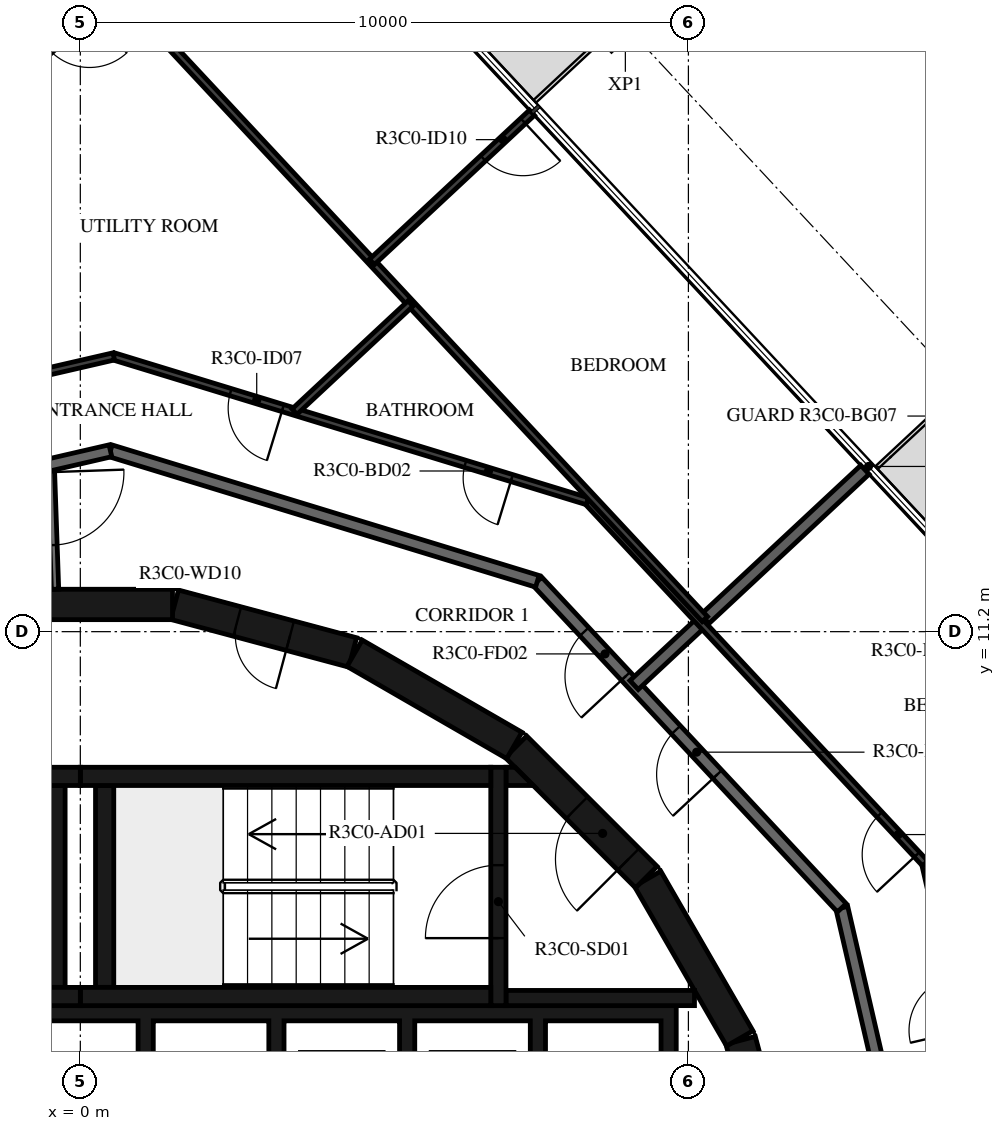
"""IFC4 building model, lengths in metres.
Left out: names, types, materials, properties, quantities, classifications, styles, units other than length and angle.
Written with IfcOpenShell. Run it as: python <this file> out.ifc"""

import sys

from ifc_helpers import new_model, si_unit, direction, frame, frame_2d, origin, place, context, subcontext, project, spatial, polyline, rectangle, outline, extrude, element, fill, save


model = new_model("IFC4")
c1 = context("Model", 3, precision=1e-05, world=origin(), true_north=direction((0.0, 1.0)))
c2 = subcontext(c1, "Body", "Model", "MODEL_VIEW")
j1 = project(units=[si_unit("LENGTHUNIT", "METRE"), si_unit("PLANEANGLEUNIT", "RADIAN")], contexts=[c1])
p1 = place(None, origin())
s1 = spatial("IfcSite", under=j1, at=p1, CompositionType="ELEMENT")
p2 = place(p1, origin())
s2 = spatial("IfcBuilding", under=s1, at=p2, CompositionType="ELEMENT")
p3 = place(p2, frame((0.0, 0.0, 141.4)))
s3 = spatial("IfcBuildingStorey", under=s2, at=p3, CompositionType="ELEMENT", Elevation=141.4)
for number, where, z_axis, x_axis in (
    (1, (11.643, 1.55, 0.0), (0.0, 0.0, 1.0), (-0.259, 0.966, 0.0)),
    (2, (10.845, 4.51, 0.0), (0.0, 0.0, 1.0), (-0.5, 0.866, 0.0)),
):
    element("IfcWall", number, at=place(p3, frame(where, z_axis=z_axis, x_axis=x_axis)), inside=s3, PredefinedType="SHEAR", context=c2, shape_type="SweptSolid", body=[
        extrude(rectangle(XDim=3.033, YDim=0.5, at=frame_2d((1.516, 0.0))), origin(), (0.0, 0.0, 1.0), 3.05),
    ])
p4 = place(p3, frame((9.308, 7.164, 0.0), z_axis=(0.0, 0.0, 1.0), x_axis=(-0.707106781187, 0.707106781187, 0.0)))
e3 = element("IfcWall", 3, at=p4, inside=s3, PredefinedType="SHEAR", context=c2, shape_type="SweptSolid", body=[
    extrude(rectangle(XDim=3.032, YDim=0.5, at=frame_2d((1.516, 0.0))), origin(), (0.0, 0.0, 1.0), 3.05),
])
p5 = place(p4, frame((0.416, 0.0, 0.0)))
e4 = element("IfcOpeningElement", 4, at=p5, cuts=e3, PredefinedType="OPENING", context=c2, shape_type="SweptSolid", body=[
    extrude(rectangle(XDim=1.2, YDim=2.1, at=frame_2d((0.6, 1.05))), frame((0.0, 0.26, 0.0), z_axis=(0.0, -1.0, 0.0), x_axis=(1.0, 0.0, 0.0)), (0.0, 0.0, 1.0), 0.52),
])
p6 = place(p3, frame((7.137, 9.329, 0.0), z_axis=(0.0, 0.0, 1.0), x_axis=(-0.865975092491, 0.500087131594, 0.0)))
e5 = element("IfcWall", 5, at=p6, inside=s3, PredefinedType="SHEAR", context=c2, shape_type="SweptSolid", body=[
    extrude(rectangle(XDim=3.033, YDim=0.5, at=frame_2d((1.516, 0.0))), origin(), (0.0, 0.0, 1.0), 3.05),
])
p7 = place(p3, frame((4.479, 10.858, 0.0), z_axis=(0.0, 0.0, 1.0), x_axis=(-0.965948410781, 0.258734743916, 0.0)))
e6 = element("IfcWall", 6, at=p7, inside=s3, PredefinedType="SHEAR", context=c2, shape_type="SweptSolid", body=[
    extrude(rectangle(XDim=3.033, YDim=0.5, at=frame_2d((1.516, 0.0))), origin(), (0.0, 0.0, 1.0), 3.05),
])
p8 = place(p7, frame((1.066, 0.0, 0.0)))
e7 = element("IfcOpeningElement", 7, at=p8, cuts=e6, PredefinedType="OPENING", context=c2, shape_type="SweptSolid", body=[
    extrude(rectangle(XDim=0.9, YDim=2.1, at=frame_2d((0.45, 1.05))), frame((0.0, 0.26, 0.0), z_axis=(0.0, -1.0, 0.0), x_axis=(1.0, 0.0, 0.0)), (0.0, 0.0, 1.0), 0.52),
])
p9 = place(p3, frame((1.516, 11.647, 0.0), z_axis=(0.0, 0.0, 1.0), x_axis=(-1.0, 0.0, 0.0)))
e8 = element("IfcWall", 8, at=p9, inside=s3, PredefinedType="SHEAR", context=c2, shape_type="SweptSolid", body=[
    extrude(rectangle(XDim=3.033, YDim=0.5, at=frame_2d((1.516, 0.0))), origin(), (0.0, 0.0, 1.0), 3.05),
])
for number, where, z_axis, x_axis in (
    (9, (0.0, 5.2, 0.0), (0.0, 0.0, 1.0), (1.0, 0.0, 0.0)),
    (10, (0.0, 8.82, 0.0), (0.0, 0.0, 1.0), (1.0, 0.0, 0.0)),
):
    element("IfcWall", number, at=place(p3, frame(where, z_axis=z_axis, x_axis=x_axis)), inside=s3, PredefinedType="SHEAR", context=c2, shape_type="SweptSolid", body=[
        extrude(rectangle(XDim=6.75, YDim=0.3, at=frame_2d((3.375, 0.0))), origin(), (0.0, 0.0, 1.0), 3.05),
    ])
p10 = place(p3, frame((0.4, 5.35, 0.0), z_axis=(0.0, 0.0, 1.0), x_axis=(0.0, 1.0, 0.0)))
e11 = element("IfcWall", 11, at=p10, inside=s3, PredefinedType="SHEAR", context=c2, shape_type="SweptSolid", body=[
    extrude(rectangle(XDim=3.32, YDim=0.3, at=frame_2d((1.66, 0.0))), origin(), (0.0, 0.0, 1.0), 3.05),
])
p11 = place(p3, frame((6.875, 5.05, 0.0), z_axis=(0.0, 0.0, 1.0), x_axis=(0.0, 1.0, 0.0)))
e12 = element("IfcWall", 12, at=p11, inside=s3, PredefinedType="SHEAR", context=c2, shape_type="SweptSolid", body=[
    extrude(rectangle(XDim=3.92, YDim=0.25, at=frame_2d((1.96, 0.0))), origin(), (0.0, 0.0, 1.0), 3.05),
])
p12 = place(p11, frame((1.11, 0.0, 0.0)))
e13 = element("IfcOpeningElement", 13, at=p12, cuts=e12, PredefinedType="OPENING", context=c2, shape_type="SweptSolid", body=[
    extrude(rectangle(XDim=1.2, YDim=2.1, at=frame_2d((0.6, 1.05))), frame((0.0, 0.135, 0.0), z_axis=(0.0, -1.0, 0.0), x_axis=(1.0, 0.0, 0.0)), (0.0, 0.0, 1.0), 0.27),
])
p13 = place(p3, frame((7.0, 5.175, 0.0), z_axis=(0.0, 0.0, 1.0), x_axis=(1.0, 0.0, 0.0)))
e14 = element("IfcWall", 14, at=p13, inside=s3, PredefinedType="SHEAR", context=c2, shape_type="SweptSolid", body=[
    extrude(rectangle(XDim=3.1, YDim=0.25, at=frame_2d((1.55, 0.0))), origin(), (0.0, 0.0, 1.0), 3.05),
])
p14 = place(p3, origin())
e15 = element("IfcWall", 15, at=p14, inside=s3, PredefinedType="SHEAR", context=c2, shape_type="SweptSolid", body=[
    extrude(outline(polyline([(7.448, 8.67), (7.0, 8.67), (7.0, 8.97), (7.148, 8.97), (7.448, 8.67)])), origin(), (0.0, 0.0, 1.0), 3.05),
])
for number, where, z_axis, x_axis in (
    (16, (-6.75, 5.2, 0.0), (0.0, 0.0, 1.0), (1.0, 0.0, 0.0)),
    (17, (-6.75, 8.82, 0.0), (0.0, 0.0, 1.0), (1.0, 0.0, 0.0)),
):
    element("IfcWall", number, at=place(p3, frame(where, z_axis=z_axis, x_axis=x_axis)), inside=s3, PredefinedType="SHEAR", context=c2, shape_type="SweptSolid", body=[
        extrude(rectangle(XDim=6.75, YDim=0.3, at=frame_2d((3.375, 0.0))), origin(), (0.0, 0.0, 1.0), 3.05),
    ])
p15 = place(p3, frame((-0.4, 5.35, 0.0), z_axis=(0.0, 0.0, 1.0), x_axis=(0.0, 1.0, 0.0)))
e18 = element("IfcWall", 18, at=p15, inside=s3, PredefinedType="SHEAR", context=c2, shape_type="SweptSolid", body=[
    extrude(rectangle(XDim=3.32, YDim=0.3, at=frame_2d((1.66, 0.0))), origin(), (0.0, 0.0, 1.0), 3.05),
])
p16 = place(p3, origin())
e19 = element("IfcWall", 19, at=p16, inside=s3, PredefinedType="SHEAR", context=c2, shape_type="SweptSolid", body=[
    extrude(outline(polyline([(-9.55, 4.8), (-7.65, 4.8), (-7.65, 1.9), (-7.4, 1.9), (-7.4, 4.8), (-5.5, 4.8), (-5.5, 1.9), (-5.25, 1.9), (-5.25, 4.8), (-3.35, 4.8), (-3.35, 1.9), (-3.1, 1.9), (-3.1, 4.8), (-1.2, 4.8), (-1.2, 1.9), (-0.95, 1.9), (-0.95, 4.8), (0.95, 4.8), (0.95, 1.9), (1.2, 1.9), (1.2, 4.8), (3.1, 4.8), (3.1, 1.9), (3.35, 1.9), (3.35, 4.8), (5.25, 4.8), (5.25, 1.9), (5.5, 1.9), (5.5, 4.8), (7.4, 4.8), (7.4, 1.9), (7.65, 1.9), (7.65, 4.8), (9.55, 4.8), (9.55, 1.9), (9.8, 1.9), (9.8, 4.8), (9.8, 5.05), (-9.8, 5.05), (-9.8, 4.8), (-9.8, 1.9), (-9.55, 1.9), (-9.55, 4.8)])), origin(), (0.0, 0.0, 1.0), 3.05),
])
p17 = place(p3, frame((-0.487, 13.948, 0.0), z_axis=(0.0, 0.0, 1.0), x_axis=(0.034859752231, -0.999392214135, 0.0)))
e20 = element("IfcWall", 20, at=p17, inside=s3, PredefinedType="PARTITIONING", context=c2, shape_type="SweptSolid", body=[
    extrude(rectangle(XDim=2.052, YDim=0.12, at=frame_2d((1.026, 0.0))), origin(), (0.0, 0.0, 1.0), 3.05),
])
p18 = place(p17, frame((0.125, 0.0, 0.0)))
e21 = element("IfcOpeningElement", 21, at=p18, cuts=e20, PredefinedType="OPENING", context=c2, shape_type="SweptSolid", body=[
    extrude(rectangle(XDim=1.2, YDim=2.1, at=frame_2d((0.6, 1.05))), frame((0.0, 0.07, 0.0), z_axis=(0.0, -1.0, 0.0), x_axis=(1.0, 0.0, 0.0)), (0.0, 0.0, 1.0), 0.14),
])
p19 = place(p3, frame((14.175, -0.495, 0.0), z_axis=(0.0, 0.0, 1.0), x_axis=(-0.224922649383, 0.974376622151, 0.0)))
e22 = element("IfcWall", 22, at=p19, inside=s3, PredefinedType="STANDARD", context=c2, shape_type="SweptSolid", body=[
    extrude(rectangle(XDim=7.342, YDim=0.2, at=frame_2d((3.671, 0.0))), origin(), (0.0, 0.0, 1.0), 3.05),
])
p20 = place(p3, frame((12.523, 6.659, 0.0), z_axis=(0.0, 0.0, 1.0), x_axis=(-0.682001841105, 0.731350455479, 0.0)))
e23 = element("IfcWall", 23, at=p20, inside=s3, PredefinedType="STANDARD", context=c2, shape_type="SweptSolid", body=[
    extrude(rectangle(XDim=7.342, YDim=0.2, at=frame_2d((3.671, 0.0))), origin(), (0.0, 0.0, 1.0), 3.05),
])
p21 = place(p20, frame((3.0, 0.0, 0.0)))
e24 = element("IfcOpeningElement", 24, at=p21, cuts=e23, PredefinedType="OPENING", context=c2, shape_type="SweptSolid", body=[
    extrude(rectangle(XDim=1.0, YDim=2.1, at=frame_2d((0.5, 1.05))), frame((0.0, 0.11, 0.0), z_axis=(0.0, -1.0, 0.0), x_axis=(1.0, 0.0, 0.0)), (0.0, 0.0, 1.0), 0.22),
])
p22 = place(p20, frame((5.209, 0.0, 0.0)))
e25 = element("IfcOpeningElement", 25, at=p22, cuts=e23, PredefinedType="OPENING", context=c2, shape_type="SweptSolid", body=[
    extrude(rectangle(XDim=1.0, YDim=2.1, at=frame_2d((0.5, 1.05))), frame((0.0, 0.11, 0.0), z_axis=(0.0, -1.0, 0.0), x_axis=(1.0, 0.0, 0.0)), (0.0, 0.0, 1.0), 0.22),
])
p23 = place(p3, frame((7.516, 12.028, 0.0), z_axis=(0.0, 0.0, 1.0), x_axis=(-0.956306642771, 0.292365533182, 0.0)))
e26 = element("IfcWall", 26, at=p23, inside=s3, PredefinedType="STANDARD", context=c2, shape_type="SweptSolid", body=[
    extrude(rectangle(XDim=7.342, YDim=0.2, at=frame_2d((3.671, 0.0))), origin(), (0.0, 0.0, 1.0), 3.05),
])
p24 = place(p3, frame((0.495, 14.175, 0.0), z_axis=(0.0, 0.0, 1.0), x_axis=(-0.974376622151, -0.224922649383, 0.0)))
e27 = element("IfcWall", 27, at=p24, inside=s3, PredefinedType="STANDARD", context=c2, shape_type="SweptSolid", body=[
    extrude(rectangle(XDim=7.342, YDim=0.2, at=frame_2d((3.671, 0.0))), origin(), (0.0, 0.0, 1.0), 3.05),
])
p25 = place(p3, frame((10.233, 11.372, 0.0), z_axis=(0.0, 0.0, 1.0), x_axis=(-0.731329353292, -0.682024469513, 0.0)))
e28 = element("IfcWall", 28, at=p25, inside=s3, PredefinedType="STANDARD", context=c2, shape_type="SweptSolid", body=[
    extrude(rectangle(XDim=1.54, YDim=0.2, at=frame_2d((0.77, 0.0))), origin(), (0.0, 0.0, 1.0), 3.05),
])
p26 = place(p3, frame((12.903, 13.862, 0.0), z_axis=(0.0, 0.0, 1.0), x_axis=(-0.731328084739, -0.682025829769, 0.0)))
e29 = element("IfcWall", 29, at=p26, inside=s3, PredefinedType="STANDARD", context=c2, shape_type="SweptSolid", body=[
    extrude(rectangle(XDim=3.6, YDim=0.2, at=frame_2d((1.8, 0.0))), origin(), (0.0, 0.0, 1.0), 3.05),
])
p27 = place(p3, frame((15.727, -0.549, 0.0), z_axis=(0.0, 0.0, 1.0), x_axis=(-0.22493611855, 0.974373512864, 0.0)))
e30 = element("IfcWall", 30, at=p27, inside=s3, PredefinedType="PARTITIONING", context=c2, shape_type="SweptSolid", body=[
    extrude(rectangle(XDim=8.146, YDim=0.12, at=frame_2d((4.073, 0.0))), origin(), (0.0, 0.0, 1.0), 3.05),
])
p28 = place(p27, frame((5.327, 0.0, 0.0)))
e31 = element("IfcOpeningElement", 31, at=p28, cuts=e30, PredefinedType="OPENING", context=c2, shape_type="SweptSolid", body=[
    extrude(rectangle(XDim=0.9, YDim=2.1, at=frame_2d((0.45, 1.05))), frame((0.0, 0.07, 0.0), z_axis=(0.0, -1.0, 0.0), x_axis=(1.0, 0.0, 0.0)), (0.0, 0.0, 1.0), 0.14),
])
p29 = place(p3, frame((13.894, 7.388, 0.0), z_axis=(0.0, 0.0, 1.0), x_axis=(-0.681994622729, 0.731357186721, 0.0)))
e32 = element("IfcWall", 32, at=p29, inside=s3, PredefinedType="PARTITIONING", context=c2, shape_type="SweptSolid", body=[
    extrude(rectangle(XDim=8.146, YDim=0.12, at=frame_2d((4.073, 0.0))), origin(), (0.0, 0.0, 1.0), 3.05),
])
p30 = place(p29, frame((0.2, 0.0, 0.0)))
e33 = element("IfcOpeningElement", 33, at=p30, cuts=e32, PredefinedType="OPENING", context=c2, shape_type="SweptSolid", body=[
    extrude(rectangle(XDim=0.9, YDim=2.1, at=frame_2d((0.45, 1.05))), frame((0.0, 0.07, 0.0), z_axis=(0.0, -1.0, 0.0), x_axis=(1.0, 0.0, 0.0)), (0.0, 0.0, 1.0), 0.14),
])
p31 = place(p3, frame((8.339, 13.345, 0.0), z_axis=(0.0, 0.0, 1.0), x_axis=(-0.956310145342, 0.292354076276, 0.0)))
e34 = element("IfcWall", 34, at=p31, inside=s3, PredefinedType="PARTITIONING", context=c2, shape_type="SweptSolid", body=[
    extrude(rectangle(XDim=8.146, YDim=0.12, at=frame_2d((4.073, 0.0))), origin(), (0.0, 0.0, 1.0), 3.05),
])
p32 = place(p31, frame((1.3, 0.0, 0.0)))
e35 = element("IfcOpeningElement", 35, at=p32, cuts=e34, PredefinedType="OPENING", context=c2, shape_type="SweptSolid", body=[
    extrude(rectangle(XDim=0.8, YDim=2.1, at=frame_2d((0.4, 1.05))), frame((0.0, 0.07, 0.0), z_axis=(0.0, -1.0, 0.0), x_axis=(1.0, 0.0, 0.0)), (0.0, 0.0, 1.0), 0.14),
])
p33 = place(p31, frame((5.237, 0.0, 0.0)))
e36 = element("IfcOpeningElement", 36, at=p33, cuts=e34, PredefinedType="OPENING", context=c2, shape_type="SweptSolid", body=[
    extrude(rectangle(XDim=0.9, YDim=2.1, at=frame_2d((0.45, 1.05))), frame((0.0, 0.07, 0.0), z_axis=(0.0, -1.0, 0.0), x_axis=(1.0, 0.0, 0.0)), (0.0, 0.0, 1.0), 0.14),
])
p34 = place(p3, frame((0.549, 15.727, 0.0), z_axis=(0.0, 0.0, 1.0), x_axis=(-0.97436861061, -0.224957352975, 0.0)))
e37 = element("IfcWall", 37, at=p34, inside=s3, PredefinedType="PARTITIONING", context=c2, shape_type="SweptSolid", body=[
    extrude(rectangle(XDim=2.004, YDim=0.12, at=frame_2d((1.002, 0.0))), origin(), (0.0, 0.0, 1.0), 3.05),
])
p35 = place(p3, frame((-1.539, 24.071, 0.0), z_axis=(0.0, 0.0, 1.0), x_axis=(0.68200220595, -0.731350115252, 0.0)))
e38 = element("IfcWall", 38, at=p35, inside=s3, PredefinedType="PARTITIONING", context=c2, shape_type="SweptSolid", body=[
    extrude(rectangle(XDim=17.316, YDim=0.12, at=frame_2d((8.658, 0.0))), origin(), (0.0, 0.0, 1.0), 3.05),
])
p36 = place(p35, frame((3.323, 0.0, 0.0)))
e39 = element("IfcOpeningElement", 39, at=p36, cuts=e38, PredefinedType="OPENING", context=c2, shape_type="SweptSolid", body=[
    extrude(rectangle(XDim=0.9, YDim=2.1, at=frame_2d((0.45, 1.05))), frame((0.0, 0.07, 0.0), z_axis=(0.0, -1.0, 0.0), x_axis=(1.0, 0.0, 0.0)), (0.0, 0.0, 1.0), 0.14),
])
p37 = place(p35, frame((0.2, 0.0, 0.0)))
e40 = element("IfcOpeningElement", 40, at=p37, cuts=e38, PredefinedType="OPENING", context=c2, shape_type="SweptSolid", body=[
    extrude(rectangle(XDim=0.9, YDim=2.1, at=frame_2d((0.45, 1.05))), frame((0.0, 0.07, 0.0), z_axis=(0.0, -1.0, 0.0), x_axis=(1.0, 0.0, 0.0)), (0.0, 0.0, 1.0), 0.14),
])
p38 = place(p3, frame((7.427, 19.734, 0.0), z_axis=(0.0, 0.0, 1.0), x_axis=(-0.73139345201, -0.681955730497, 0.0)))
e41 = element("IfcWall", 41, at=p38, inside=s3, PredefinedType="PARTITIONING", context=c2, shape_type="SweptSolid", body=[
    extrude(rectangle(XDim=3.6, YDim=0.12, at=frame_2d((1.8, 0.0))), origin(), (0.0, 0.0, 1.0), 3.05),
])
p39 = place(p38, frame((0.2, 0.0, 0.0)))
e42 = element("IfcOpeningElement", 42, at=p39, cuts=e41, PredefinedType="OPENING", context=c2, shape_type="SweptSolid", body=[
    extrude(rectangle(XDim=0.9, YDim=2.1, at=frame_2d((0.45, 1.05))), frame((0.0, 0.07, 0.0), z_axis=(0.0, -1.0, 0.0), x_axis=(1.0, 0.0, 0.0)), (0.0, 0.0, 1.0), 0.14),
])
p40 = place(p3, frame((5.431, 16.597, 0.0), z_axis=(0.0, 0.0, 1.0), x_axis=(-0.731378807316, -0.681971436505, 0.0)))
e43 = element("IfcWall", 43, at=p40, inside=s3, PredefinedType="PARTITIONING", context=c2, shape_type="SweptSolid", body=[
    extrude(rectangle(XDim=2.609, YDim=0.12, at=frame_2d((1.305, 0.0))), origin(), (0.0, 0.0, 1.0), 3.05),
])
p41 = place(p3, frame((0.591, 21.787, 0.0), z_axis=(0.0, 0.0, 1.0), x_axis=(-0.731364619453, -0.681986651931, 0.0)))
e44 = element("IfcWall", 44, at=p41, inside=s3, PredefinedType="PARTITIONING", context=c2, shape_type="SweptSolid", body=[
    extrude(rectangle(XDim=3.936, YDim=0.12, at=frame_2d((1.968, 0.0))), origin(), (0.0, 0.0, 1.0), 3.05),
])
p42 = place(p41, frame((0.6, 0.0, 0.0)))
e45 = element("IfcOpeningElement", 45, at=p42, cuts=e44, PredefinedType="OPENING", context=c2, shape_type="SweptSolid", body=[
    extrude(rectangle(XDim=0.9, YDim=2.1, at=frame_2d((0.45, 1.05))), frame((0.0, 0.07, 0.0), z_axis=(0.0, -1.0, 0.0), x_axis=(1.0, 0.0, 0.0)), (0.0, 0.0, 1.0), 0.14),
])
p43 = place(p12, origin())
e46 = element("IfcDoor", 46, at=p43, inside=s3, OperationType="SINGLE_SWING_LEFT", PredefinedType="DOOR", context=c2, shape_type="SweptSolid", body=[
    extrude(rectangle(XDim=1.2, YDim=2.1, at=frame_2d((0.6, 1.05))), frame((0.0, 0.025, 0.0), z_axis=(0.0, -1.0, 0.0), x_axis=(1.0, 0.0, 0.0)), (0.0, 0.0, 1.0), 0.05),
])
fill(e13, e46)
p44 = place(p5, origin())
e47 = element("IfcDoor", 47, at=p44, inside=s3, OperationType="SINGLE_SWING_RIGHT", PredefinedType="DOOR", context=c2, shape_type="SweptSolid", body=[
    extrude(rectangle(XDim=1.2, YDim=2.1, at=frame_2d((0.6, 1.05))), frame((0.0, 0.025, 0.0), z_axis=(0.0, -1.0, 0.0), x_axis=(1.0, 0.0, 0.0)), (0.0, 0.0, 1.0), 0.05),
])
fill(e4, e47)
p45 = place(p8, origin())
e48 = element("IfcDoor", 48, at=p45, inside=s3, OperationType="SINGLE_SWING_LEFT", PredefinedType="DOOR", context=c2, shape_type="SweptSolid", body=[
    extrude(rectangle(XDim=0.9, YDim=2.1, at=frame_2d((0.45, 1.05))), frame((0.0, 0.025, 0.0), z_axis=(0.0, -1.0, 0.0), x_axis=(1.0, 0.0, 0.0)), (0.0, 0.0, 1.0), 0.05),
])
fill(e7, e48)
p46 = place(p21, origin())
e49 = element("IfcDoor", 49, at=p46, inside=s3, OperationType="SINGLE_SWING_LEFT", PredefinedType="DOOR", context=c2, shape_type="SweptSolid", body=[
    extrude(rectangle(XDim=1.0, YDim=2.1, at=frame_2d((0.5, 1.05))), frame((0.0, 0.025, 0.0), z_axis=(0.0, -1.0, 0.0), x_axis=(1.0, 0.0, 0.0)), (0.0, 0.0, 1.0), 0.05),
])
fill(e24, e49)
p47 = place(p30, origin())
e50 = element("IfcDoor", 50, at=p47, inside=s3, OperationType="SINGLE_SWING_LEFT", PredefinedType="DOOR", context=c2, shape_type="SweptSolid", body=[
    extrude(rectangle(XDim=0.9, YDim=2.1, at=frame_2d((0.45, 1.05))), frame((0.0, 0.025, 0.0), z_axis=(0.0, -1.0, 0.0), x_axis=(1.0, 0.0, 0.0)), (0.0, 0.0, 1.0), 0.05),
])
fill(e33, e50)
p48 = place(p22, origin())
e51 = element("IfcDoor", 51, at=p48, inside=s3, OperationType="SINGLE_SWING_RIGHT", PredefinedType="DOOR", context=c2, shape_type="SweptSolid", body=[
    extrude(rectangle(XDim=1.0, YDim=2.1, at=frame_2d((0.5, 1.05))), frame((0.0, 0.025, 0.0), z_axis=(0.0, -1.0, 0.0), x_axis=(1.0, 0.0, 0.0)), (0.0, 0.0, 1.0), 0.05),
])
fill(e25, e51)
p49 = place(p32, origin())
e52 = element("IfcDoor", 52, at=p49, inside=s3, OperationType="SINGLE_SWING_RIGHT", PredefinedType="DOOR", context=c2, shape_type="SweptSolid", body=[
    extrude(rectangle(XDim=0.8, YDim=2.1, at=frame_2d((0.4, 1.05))), frame((0.0, 0.025, 0.0), z_axis=(0.0, -1.0, 0.0), x_axis=(1.0, 0.0, 0.0)), (0.0, 0.0, 1.0), 0.05),
])
fill(e35, e52)
p50 = place(p33, origin())
e53 = element("IfcDoor", 53, at=p50, inside=s3, OperationType="SINGLE_SWING_RIGHT", PredefinedType="DOOR", context=c2, shape_type="SweptSolid", body=[
    extrude(rectangle(XDim=0.9, YDim=2.1, at=frame_2d((0.45, 1.05))), frame((0.0, 0.025, 0.0), z_axis=(0.0, -1.0, 0.0), x_axis=(1.0, 0.0, 0.0)), (0.0, 0.0, 1.0), 0.05),
])
fill(e36, e53)
p51 = place(p39, origin())
e54 = element("IfcDoor", 54, at=p51, inside=s3, OperationType="SINGLE_SWING_LEFT", PredefinedType="DOOR", context=c2, shape_type="SweptSolid", body=[
    extrude(rectangle(XDim=0.9, YDim=2.1, at=frame_2d((0.45, 1.05))), frame((0.0, 0.025, 0.0), z_axis=(0.0, -1.0, 0.0), x_axis=(1.0, 0.0, 0.0)), (0.0, 0.0, 1.0), 0.05),
])
fill(e42, e54)
p52 = place(p18, origin())
e55 = element("IfcDoor", 55, at=p52, inside=s3, OperationType="DOUBLE_DOOR_SINGLE_SWING", PredefinedType="DOOR", context=c2, shape_type="SweptSolid", body=[
    extrude(rectangle(XDim=1.2, YDim=2.1, at=frame_2d((0.6, 1.05))), frame((0.0, 0.025, 0.0), z_axis=(0.0, -1.0, 0.0), x_axis=(1.0, 0.0, 0.0)), (0.0, 0.0, 1.0), 0.05),
])
fill(e21, e55)
save(model, sys.argv[1])
